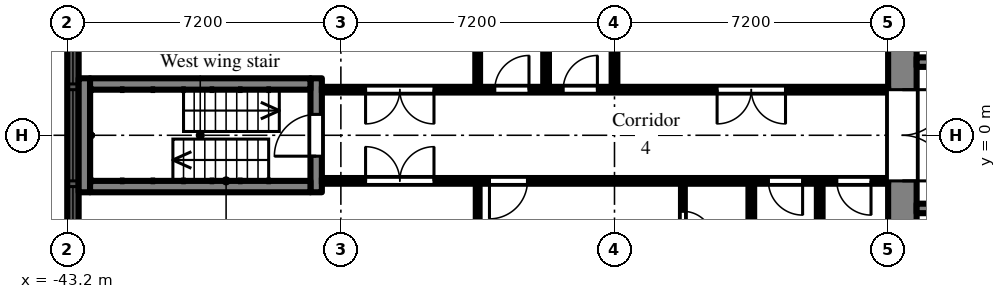
"""IFC4 building model, lengths in metres.
Left out: names, types, materials, properties, quantities, classifications, styles, units other than length and angle.
Written with IfcOpenShell. Run it as: python <this file> out.ifc"""

import sys

from ifc_helpers import new_model, si_unit, direction, frame, frame_2d, origin, place, context, subcontext, project, spatial, rectangle, extrude, element, fill, save


model = new_model("IFC4")
c1 = context("Model", 3, precision=1e-05, world=origin(), true_north=direction((0.0, 1.0)))
c2 = subcontext(c1, "Body", "Model", "MODEL_VIEW")
j1 = project(units=[si_unit("LENGTHUNIT", "METRE"), si_unit("PLANEANGLEUNIT", "RADIAN")], contexts=[c1])
p1 = place(None, origin())
s1 = spatial("IfcSite", under=j1, at=p1, CompositionType="ELEMENT")
p2 = place(p1, origin())
s2 = spatial("IfcBuilding", under=s1, at=p2, CompositionType="ELEMENT")
p3 = place(p2, frame((0.0, 0.0, 75.9)))
s3 = spatial("IfcBuildingStorey", under=s2, at=p3, CompositionType="ELEMENT", Elevation=75.9)
p4 = place(p3, frame((-43.05, 2.7, 0.0), z_axis=(0.0, 0.0, 1.0), x_axis=(0.0, -1.0, 0.0)))
e1 = element("IfcWall", 1, at=p4, inside=s3, PredefinedType="SOLIDWALL", context=c2, shape_type="SweptSolid", body=[
    extrude(rectangle(XDim=5.4, YDim=0.3, at=frame_2d((2.7, 0.0))), origin(), (0.0, 0.0, 1.0), 2.1),
])
p5 = place(p4, frame((1.5, 0.0, 0.2)))
e2 = element("IfcOpeningElement", 2, at=p5, cuts=e1, PredefinedType="OPENING", context=c2, shape_type="SweptSolid", body=[
    extrude(rectangle(XDim=2.4, YDim=1.85, at=frame_2d((1.2, 0.925))), frame((0.0, 0.16, 0.0), z_axis=(0.0, -1.0, 0.0), x_axis=(1.0, 0.0, 0.0)), (0.0, 0.0, 1.0), 0.32),
])
p6 = place(p4, frame((0.15, 0.0, 0.2)))
e3 = element("IfcOpeningElement", 3, at=p6, cuts=e1, PredefinedType="OPENING", context=c2, shape_type="SweptSolid", body=[
    extrude(rectangle(XDim=1.2, YDim=1.85, at=frame_2d((0.6, 0.925))), frame((0.0, 0.16, 0.0), z_axis=(0.0, -1.0, 0.0), x_axis=(1.0, 0.0, 0.0)), (0.0, 0.0, 1.0), 0.32),
])
p7 = place(p4, frame((4.05, 0.0, 0.2)))
e4 = element("IfcOpeningElement", 4, at=p7, cuts=e1, PredefinedType="OPENING", context=c2, shape_type="SweptSolid", body=[
    extrude(rectangle(XDim=1.2, YDim=1.85, at=frame_2d((0.6, 0.925))), frame((0.0, 0.16, 0.0), z_axis=(0.0, -1.0, 0.0), x_axis=(1.0, 0.0, 0.0)), (0.0, 0.0, 1.0), 0.32),
])
p8 = place(p3, frame((-21.225, -7.2, 0.0), z_axis=(0.0, 0.0, 1.0), x_axis=(0.0, 1.0, 0.0)))
e5 = element("IfcWall", 5, at=p8, inside=s3, PredefinedType="SHEAR", context=c2, shape_type="SweptSolid", body=[
    extrude(rectangle(XDim=14.4, YDim=0.75, at=frame_2d((7.2, 0.0))), origin(), (0.0, 0.0, 1.0), 2.575),
])
p9 = place(p8, frame((6.0, 0.0, 0.0)))
e6 = element("IfcOpeningElement", 6, at=p9, cuts=e5, PredefinedType="OPENING", context=c2, shape_type="SweptSolid", body=[
    extrude(rectangle(XDim=2.4, YDim=2.2, at=frame_2d((1.2, 1.1))), frame((0.0, 0.385, 0.0), z_axis=(0.0, -1.0, 0.0), x_axis=(1.0, 0.0, 0.0)), (0.0, 0.0, 1.0), 0.77),
])
p10 = place(p3, frame((-7.9, 1.925, 0.0), z_axis=(0.0, 0.0, 1.0), x_axis=(-1.0, 0.0, 0.0)))
e7 = element("IfcWall", 7, at=p10, inside=s3, PredefinedType="SHEAR", context=c2, shape_type="SweptSolid", body=[
    extrude(rectangle(XDim=12.95, YDim=0.25, at=frame_2d((6.475, 0.0))), origin(), (0.0, 0.0, 1.0), 2.575),
])
p11 = place(p10, frame((0.525, 0.0, 0.0)))
e8 = element("IfcOpeningElement", 8, at=p11, cuts=e7, PredefinedType="OPENING", context=c2, shape_type="SweptSolid", body=[
    extrude(rectangle(XDim=0.9, YDim=2.1, at=frame_2d((0.45, 1.05))), frame((0.0, 0.135, 0.0), z_axis=(0.0, -1.0, 0.0), x_axis=(1.0, 0.0, 0.0)), (0.0, 0.0, 1.0), 0.27),
])
p12 = place(p10, frame((2.625, 0.0, 0.0)))
e9 = element("IfcOpeningElement", 9, at=p12, cuts=e7, PredefinedType="OPENING", context=c2, shape_type="SweptSolid", body=[
    extrude(rectangle(XDim=1.1, YDim=2.1, at=frame_2d((0.55, 1.05))), frame((0.0, 0.135, 0.0), z_axis=(0.0, -1.0, 0.0), x_axis=(1.0, 0.0, 0.0)), (0.0, 0.0, 1.0), 0.27),
])
p13 = place(p10, frame((4.925, 0.0, 0.0)))
e10 = element("IfcOpeningElement", 10, at=p13, cuts=e7, PredefinedType="OPENING", context=c2, shape_type="SweptSolid", body=[
    extrude(rectangle(XDim=0.9, YDim=2.1, at=frame_2d((0.45, 1.05))), frame((0.0, 0.135, 0.0), z_axis=(0.0, -1.0, 0.0), x_axis=(1.0, 0.0, 0.0)), (0.0, 0.0, 1.0), 0.27),
])
p14 = place(p10, frame((8.225, 0.0, 0.0)))
e11 = element("IfcOpeningElement", 11, at=p14, cuts=e7, PredefinedType="OPENING", context=c2, shape_type="SweptSolid", body=[
    extrude(rectangle(XDim=0.9, YDim=2.1, at=frame_2d((0.45, 1.05))), frame((0.0, 0.135, 0.0), z_axis=(0.0, -1.0, 0.0), x_axis=(1.0, 0.0, 0.0)), (0.0, 0.0, 1.0), 0.27),
])
p15 = place(p3, frame((-7.9, -1.925, 0.0), z_axis=(0.0, 0.0, 1.0), x_axis=(-1.0, 0.0, 0.0)))
e12 = element("IfcWall", 12, at=p15, inside=s3, PredefinedType="SHEAR", context=c2, shape_type="SweptSolid", body=[
    extrude(rectangle(XDim=12.95, YDim=0.25, at=frame_2d((6.475, 0.0))), origin(), (0.0, 0.0, 1.0), 2.575),
])
p16 = place(p15, frame((4.825, 0.0, 0.0)))
e13 = element("IfcOpeningElement", 13, at=p16, cuts=e12, PredefinedType="OPENING", context=c2, shape_type="SweptSolid", body=[
    extrude(rectangle(XDim=1.1, YDim=2.1, at=frame_2d((0.55, 1.05))), frame((0.0, 0.135, 0.0), z_axis=(0.0, -1.0, 0.0), x_axis=(1.0, 0.0, 0.0)), (0.0, 0.0, 1.0), 0.27),
])
p17 = place(p15, frame((7.025, 0.0, 0.0)))
e14 = element("IfcOpeningElement", 14, at=p17, cuts=e12, PredefinedType="OPENING", context=c2, shape_type="SweptSolid", body=[
    extrude(rectangle(XDim=1.1, YDim=2.1, at=frame_2d((0.55, 1.05))), frame((0.0, 0.135, 0.0), z_axis=(0.0, -1.0, 0.0), x_axis=(1.0, 0.0, 0.0)), (0.0, 0.0, 1.0), 0.27),
])
p18 = place(p15, frame((9.225, 0.0, 0.0)))
e15 = element("IfcOpeningElement", 15, at=p18, cuts=e12, PredefinedType="OPENING", context=c2, shape_type="SweptSolid", body=[
    extrude(rectangle(XDim=1.1, YDim=2.1, at=frame_2d((0.55, 1.05))), frame((0.0, 0.135, 0.0), z_axis=(0.0, -1.0, 0.0), x_axis=(1.0, 0.0, 0.0)), (0.0, 0.0, 1.0), 0.27),
])
p19 = place(p15, frame((0.525, 0.0, 0.0)))
e16 = element("IfcOpeningElement", 16, at=p19, cuts=e12, PredefinedType="OPENING", context=c2, shape_type="SweptSolid", body=[
    extrude(rectangle(XDim=0.9, YDim=2.1, at=frame_2d((0.45, 1.05))), frame((0.0, 0.135, 0.0), z_axis=(0.0, -1.0, 0.0), x_axis=(1.0, 0.0, 0.0)), (0.0, 0.0, 1.0), 0.27),
])
p20 = place(p15, frame((2.625, 0.0, 0.0)))
e17 = element("IfcOpeningElement", 17, at=p20, cuts=e12, PredefinedType="OPENING", context=c2, shape_type="SweptSolid", body=[
    extrude(rectangle(XDim=1.1, YDim=2.1, at=frame_2d((0.55, 1.05))), frame((0.0, 0.135, 0.0), z_axis=(0.0, -1.0, 0.0), x_axis=(1.0, 0.0, 0.0)), (0.0, 0.0, 1.0), 0.27),
])
p21 = place(p3, frame((-36.65, -1.5, 0.0), z_axis=(0.0, 0.0, 1.0), x_axis=(0.0, 1.0, 0.0)))
e18 = element("IfcWall", 18, at=p21, inside=s3, PredefinedType="SHEAR", context=c2, shape_type="SweptSolid", body=[
    extrude(rectangle(XDim=3.0, YDim=0.3, at=frame_2d((1.5, 0.0))), origin(), (0.0, 0.0, 1.0), 2.575),
])
p22 = place(p21, frame((0.95, 0.0, 0.0)))
e19 = element("IfcOpeningElement", 19, at=p22, cuts=e18, PredefinedType="OPENING", context=c2, shape_type="SweptSolid", body=[
    extrude(rectangle(XDim=1.1, YDim=2.1, at=frame_2d((0.55, 1.05))), frame((0.0, 0.16, 0.0), z_axis=(0.0, -1.0, 0.0), x_axis=(1.0, 0.0, 0.0)), (0.0, 0.0, 1.0), 0.32),
])
p23 = place(p3, frame((-42.75, -1.5, 0.0), z_axis=(0.0, 0.0, 1.0), x_axis=(0.0, 1.0, 0.0)))
e20 = element("IfcWall", 20, at=p23, inside=s3, PredefinedType="SHEAR", context=c2, shape_type="SweptSolid", body=[
    extrude(rectangle(XDim=3.0, YDim=0.3, at=frame_2d((1.5, 0.0))), origin(), (0.0, 0.0, 1.0), 2.575),
])
for number, where, z_axis, x_axis in (
    (21, (-36.8, -1.35, 0.0), (0.0, 0.0, 1.0), (-1.0, 0.0, 0.0)),
    (22, (-36.8, 1.35, 0.0), (0.0, 0.0, 1.0), (-1.0, 0.0, 0.0)),
):
    element("IfcWall", number, at=place(p3, frame(where, z_axis=z_axis, x_axis=x_axis)), inside=s3, PredefinedType="SHEAR", context=c2, shape_type="SweptSolid", body=[
        extrude(rectangle(XDim=5.8, YDim=0.3, at=frame_2d((2.9, 0.0))), origin(), (0.0, 0.0, 1.0), 2.575),
    ])
p24 = place(p3, frame((-36.5, -1.2, 0.0), z_axis=(0.0, 0.0, 1.0), x_axis=(1.0, 0.0, 0.0)))
e23 = element("IfcWall", 23, at=p24, inside=s3, PredefinedType="PARTITIONING", context=c2, shape_type="SweptSolid", body=[
    extrude(rectangle(XDim=14.9, YDim=0.15, at=frame_2d((7.45, 0.0))), origin(), (0.0, 0.0, 1.0), 2.575),
])
p25 = place(p24, frame((13.55, 0.0, 0.0)))
e24 = element("IfcOpeningElement", 24, at=p25, cuts=e23, PredefinedType="OPENING", context=c2, shape_type="SweptSolid", body=[
    extrude(rectangle(XDim=0.9, YDim=2.1, at=frame_2d((0.45, 1.05))), frame((0.0, 0.085, 0.0), z_axis=(0.0, -1.0, 0.0), x_axis=(1.0, 0.0, 0.0)), (0.0, 0.0, 1.0), 0.17),
])
p26 = place(p24, frame((11.75, 0.0, 0.0)))
e25 = element("IfcOpeningElement", 25, at=p26, cuts=e23, PredefinedType="OPENING", context=c2, shape_type="SweptSolid", body=[
    extrude(rectangle(XDim=0.9, YDim=2.1, at=frame_2d((0.45, 1.05))), frame((0.0, 0.085, 0.0), z_axis=(0.0, -1.0, 0.0), x_axis=(1.0, 0.0, 0.0)), (0.0, 0.0, 1.0), 0.17),
])
p27 = place(p24, frame((4.41, 0.0, 0.0)))
e26 = element("IfcOpeningElement", 26, at=p27, cuts=e23, PredefinedType="OPENING", context=c2, shape_type="SweptSolid", body=[
    extrude(rectangle(XDim=1.0, YDim=2.1, at=frame_2d((0.5, 1.05))), frame((0.0, 0.085, 0.0), z_axis=(0.0, -1.0, 0.0), x_axis=(1.0, 0.0, 0.0)), (0.0, 0.0, 1.0), 0.17),
])
p28 = place(p24, frame((1.15, 0.0, 0.0)))
e27 = element("IfcOpeningElement", 27, at=p28, cuts=e23, PredefinedType="OPENING", context=c2, shape_type="SweptSolid", body=[
    extrude(rectangle(XDim=1.8, YDim=2.1, at=frame_2d((0.9, 1.05))), frame((0.0, 0.085, 0.0), z_axis=(0.0, -1.0, 0.0), x_axis=(1.0, 0.0, 0.0)), (0.0, 0.0, 1.0), 0.17),
])
p29 = place(p3, frame((-36.5, 1.2, 0.0), z_axis=(0.0, 0.0, 1.0), x_axis=(1.0, 0.0, 0.0)))
e28 = element("IfcWall", 28, at=p29, inside=s3, PredefinedType="PARTITIONING", context=c2, shape_type="SweptSolid", body=[
    extrude(rectangle(XDim=14.9, YDim=0.15, at=frame_2d((7.45, 0.0))), origin(), (0.0, 0.0, 1.0), 2.575),
])
p30 = place(p29, frame((10.4, 0.0, 0.0)))
e29 = element("IfcOpeningElement", 29, at=p30, cuts=e28, PredefinedType="OPENING", context=c2, shape_type="SweptSolid", body=[
    extrude(rectangle(XDim=1.8, YDim=2.1, at=frame_2d((0.9, 1.05))), frame((0.0, 0.085, 0.0), z_axis=(0.0, -1.0, 0.0), x_axis=(1.0, 0.0, 0.0)), (0.0, 0.0, 1.0), 0.17),
])
p31 = place(p29, frame((6.35, 0.0, 0.0)))
e30 = element("IfcOpeningElement", 30, at=p31, cuts=e28, PredefinedType="OPENING", context=c2, shape_type="SweptSolid", body=[
    extrude(rectangle(XDim=0.9, YDim=2.1, at=frame_2d((0.45, 1.05))), frame((0.0, 0.085, 0.0), z_axis=(0.0, -1.0, 0.0), x_axis=(1.0, 0.0, 0.0)), (0.0, 0.0, 1.0), 0.17),
])
p32 = place(p29, frame((4.55, 0.0, 0.0)))
e31 = element("IfcOpeningElement", 31, at=p32, cuts=e28, PredefinedType="OPENING", context=c2, shape_type="SweptSolid", body=[
    extrude(rectangle(XDim=0.9, YDim=2.1, at=frame_2d((0.45, 1.05))), frame((0.0, 0.085, 0.0), z_axis=(0.0, -1.0, 0.0), x_axis=(1.0, 0.0, 0.0)), (0.0, 0.0, 1.0), 0.17),
])
p33 = place(p29, frame((1.15, 0.0, 0.0)))
e32 = element("IfcOpeningElement", 32, at=p33, cuts=e28, PredefinedType="OPENING", context=c2, shape_type="SweptSolid", body=[
    extrude(rectangle(XDim=1.8, YDim=2.1, at=frame_2d((0.9, 1.05))), frame((0.0, 0.085, 0.0), z_axis=(0.0, -1.0, 0.0), x_axis=(1.0, 0.0, 0.0)), (0.0, 0.0, 1.0), 0.17),
])
p34 = place(p3, frame((-32.4, -6.9, 0.0), z_axis=(0.0, 0.0, 1.0), x_axis=(0.0, 1.0, 0.0)))
e33 = element("IfcWall", 33, at=p34, inside=s3, PredefinedType="PARTITIONING", context=c2, shape_type="SweptSolid", body=[
    extrude(rectangle(XDim=5.625, YDim=0.1, at=frame_2d((2.812, 0.0))), origin(), (0.0, 0.0, 1.0), 2.575),
])
p35 = place(p3, frame((-32.4, 1.275, 0.0), z_axis=(0.0, 0.0, 1.0), x_axis=(0.0, 1.0, 0.0)))
e34 = element("IfcWall", 34, at=p35, inside=s3, PredefinedType="PARTITIONING", context=c2, shape_type="SweptSolid", body=[
    extrude(rectangle(XDim=5.625, YDim=0.125, at=frame_2d((2.812, 0.0))), origin(), (0.0, 0.0, 1.0), 2.575),
])
for number, where, z_axis, x_axis in (
    (35, (-30.6, 1.275, 0.0), (0.0, 0.0, 1.0), (0.0, 1.0, 0.0)),
    (36, (-28.8, 1.275, 0.0), (0.0, 0.0, 1.0), (0.0, 1.0, 0.0)),
):
    element("IfcWall", number, at=place(p3, frame(where, z_axis=z_axis, x_axis=x_axis)), inside=s3, PredefinedType="PARTITIONING", context=c2, shape_type="SweptSolid", body=[
        extrude(rectangle(XDim=5.625, YDim=0.15, at=frame_2d((2.812, 0.0))), origin(), (0.0, 0.0, 1.0), 2.575),
    ])
p36 = place(p3, frame((-27.0, -3.65, 0.0), z_axis=(0.0, 0.0, 1.0), x_axis=(0.0, 1.0, 0.0)))
e37 = element("IfcWall", 37, at=p36, inside=s3, PredefinedType="PARTITIONING", context=c2, shape_type="SweptSolid", body=[
    extrude(rectangle(XDim=2.375, YDim=0.1, at=frame_2d((1.188, 0.0))), origin(), (0.0, 0.0, 1.0), 2.575),
])
p37 = place(p36, frame((0.85, 0.0, 0.0)))
e38 = element("IfcOpeningElement", 38, at=p37, cuts=e37, PredefinedType="OPENING", context=c2, shape_type="SweptSolid", body=[
    extrude(rectangle(XDim=0.8, YDim=2.1, at=frame_2d((0.4, 1.05))), frame((0.0, 0.06, 0.0), z_axis=(0.0, -1.0, 0.0), x_axis=(1.0, 0.0, 0.0)), (0.0, 0.0, 1.0), 0.12),
])
for number, where, z_axis, x_axis in (
    (39, (-25.2, -6.9, 0.0), (0.0, 0.0, 1.0), (0.0, 1.0, 0.0)),
    (40, (-23.4, -6.9, 0.0), (0.0, 0.0, 1.0), (0.0, 1.0, 0.0)),
):
    element("IfcWall", number, at=place(p3, frame(where, z_axis=z_axis, x_axis=x_axis)), inside=s3, PredefinedType="PARTITIONING", context=c2, shape_type="SweptSolid", body=[
        extrude(rectangle(XDim=5.625, YDim=0.15, at=frame_2d((2.812, 0.0))), origin(), (0.0, 0.0, 1.0), 2.575),
    ])
p38 = place(p5, origin())
e41 = element("IfcWindow", 41, at=p38, inside=s3, PartitioningType="SINGLE_PANEL", PredefinedType="WINDOW", context=c2, shape_type="SweptSolid", body=[
    extrude(rectangle(XDim=2.4, YDim=1.85, at=frame_2d((1.2, 0.925))), frame((0.0, 0.03, 0.0), z_axis=(0.0, -1.0, 0.0), x_axis=(1.0, 0.0, 0.0)), (0.0, 0.0, 1.0), 0.06),
])
fill(e2, e41)
p39 = place(p6, origin())
e42 = element("IfcWindow", 42, at=p39, inside=s3, PartitioningType="SINGLE_PANEL", PredefinedType="WINDOW", context=c2, shape_type="SweptSolid", body=[
    extrude(rectangle(XDim=1.2, YDim=1.85, at=frame_2d((0.6, 0.925))), frame((0.0, 0.03, 0.0), z_axis=(0.0, -1.0, 0.0), x_axis=(1.0, 0.0, 0.0)), (0.0, 0.0, 1.0), 0.06),
])
fill(e3, e42)
p40 = place(p7, origin())
e43 = element("IfcWindow", 43, at=p40, inside=s3, PartitioningType="SINGLE_PANEL", PredefinedType="WINDOW", context=c2, shape_type="SweptSolid", body=[
    extrude(rectangle(XDim=1.2, YDim=1.85, at=frame_2d((0.6, 0.925))), frame((0.0, 0.03, 0.0), z_axis=(0.0, -1.0, 0.0), x_axis=(1.0, 0.0, 0.0)), (0.0, 0.0, 1.0), 0.06),
])
fill(e4, e43)
p41 = place(p9, frame((2.4, 0.0, 0.0), z_axis=(0.0, 0.0, 1.0), x_axis=(-1.0, 0.0, 0.0)))
e44 = element("IfcDoor", 44, at=p41, inside=s3, OperationType="DOUBLE_DOOR_DOUBLE_SWING", PredefinedType="DOOR", context=c2, shape_type="SweptSolid", body=[
    extrude(rectangle(XDim=2.4, YDim=2.2, at=frame_2d((1.2, 1.1))), frame((0.0, 0.025, 0.0), z_axis=(0.0, -1.0, 0.0), x_axis=(1.0, 0.0, 0.0)), (0.0, 0.0, 1.0), 0.05),
])
fill(e6, e44)
p42 = place(p22, origin())
e45 = element("IfcDoor", 45, at=p42, inside=s3, OperationType="SINGLE_SWING_LEFT", PredefinedType="DOOR", context=c2, shape_type="SweptSolid", body=[
    extrude(rectangle(XDim=1.1, YDim=2.1, at=frame_2d((0.55, 1.05))), frame((0.0, 0.025, 0.0), z_axis=(0.0, -1.0, 0.0), x_axis=(1.0, 0.0, 0.0)), (0.0, 0.0, 1.0), 0.05),
])
fill(e19, e45)
p43 = place(p25, frame((0.9, 0.0, 0.0), z_axis=(0.0, 0.0, 1.0), x_axis=(-1.0, 0.0, 0.0)))
e46 = element("IfcDoor", 46, at=p43, inside=s3, OperationType="SINGLE_SWING_LEFT", PredefinedType="DOOR", context=c2, shape_type="SweptSolid", body=[
    extrude(rectangle(XDim=0.9, YDim=2.1, at=frame_2d((0.45, 1.05))), frame((0.0, 0.025, 0.0), z_axis=(0.0, -1.0, 0.0), x_axis=(1.0, 0.0, 0.0)), (0.0, 0.0, 1.0), 0.05),
])
fill(e24, e46)
p44 = place(p26, frame((0.9, 0.0, 0.0), z_axis=(0.0, 0.0, 1.0), x_axis=(-1.0, 0.0, 0.0)))
e47 = element("IfcDoor", 47, at=p44, inside=s3, OperationType="SINGLE_SWING_LEFT", PredefinedType="DOOR", context=c2, shape_type="SweptSolid", body=[
    extrude(rectangle(XDim=0.9, YDim=2.1, at=frame_2d((0.45, 1.05))), frame((0.0, 0.025, 0.0), z_axis=(0.0, -1.0, 0.0), x_axis=(1.0, 0.0, 0.0)), (0.0, 0.0, 1.0), 0.05),
])
fill(e25, e47)
p45 = place(p37, frame((0.8, 0.0, 0.0), z_axis=(0.0, 0.0, 1.0), x_axis=(-1.0, 0.0, 0.0)))
e48 = element("IfcDoor", 48, at=p45, inside=s3, OperationType="SINGLE_SWING_RIGHT", PredefinedType="DOOR", context=c2, shape_type="SweptSolid", body=[
    extrude(rectangle(XDim=0.8, YDim=2.1, at=frame_2d((0.4, 1.05))), frame((0.0, 0.025, 0.0), z_axis=(0.0, -1.0, 0.0), x_axis=(1.0, 0.0, 0.0)), (0.0, 0.0, 1.0), 0.05),
])
fill(e38, e48)
p46 = place(p27, frame((1.0, 0.0, 0.0), z_axis=(0.0, 0.0, 1.0), x_axis=(-1.0, 0.0, 0.0)))
e49 = element("IfcDoor", 49, at=p46, inside=s3, OperationType="SINGLE_SWING_RIGHT", PredefinedType="DOOR", context=c2, shape_type="SweptSolid", body=[
    extrude(rectangle(XDim=1.0, YDim=2.1, at=frame_2d((0.5, 1.05))), frame((0.0, 0.025, 0.0), z_axis=(0.0, -1.0, 0.0), x_axis=(1.0, 0.0, 0.0)), (0.0, 0.0, 1.0), 0.05),
])
fill(e26, e49)
p47 = place(p28, origin())
e50 = element("IfcDoor", 50, at=p47, inside=s3, OperationType="DOUBLE_DOOR_DOUBLE_SWING", PredefinedType="DOOR", context=c2, shape_type="SweptSolid", body=[
    extrude(rectangle(XDim=1.8, YDim=2.1, at=frame_2d((0.9, 1.05))), frame((0.0, 0.025, 0.0), z_axis=(0.0, -1.0, 0.0), x_axis=(1.0, 0.0, 0.0)), (0.0, 0.0, 1.0), 0.05),
])
fill(e27, e50)
p48 = place(p30, frame((1.8, 0.0, 0.0), z_axis=(0.0, 0.0, 1.0), x_axis=(-1.0, 0.0, 0.0)))
e51 = element("IfcDoor", 51, at=p48, inside=s3, OperationType="DOUBLE_DOOR_DOUBLE_SWING", PredefinedType="DOOR", context=c2, shape_type="SweptSolid", body=[
    extrude(rectangle(XDim=1.8, YDim=2.1, at=frame_2d((0.9, 1.05))), frame((0.0, 0.025, 0.0), z_axis=(0.0, -1.0, 0.0), x_axis=(1.0, 0.0, 0.0)), (0.0, 0.0, 1.0), 0.05),
])
fill(e29, e51)
p49 = place(p31, origin())
e52 = element("IfcDoor", 52, at=p49, inside=s3, OperationType="SINGLE_SWING_RIGHT", PredefinedType="DOOR", context=c2, shape_type="SweptSolid", body=[
    extrude(rectangle(XDim=0.9, YDim=2.1, at=frame_2d((0.45, 1.05))), frame((0.0, 0.025, 0.0), z_axis=(0.0, -1.0, 0.0), x_axis=(1.0, 0.0, 0.0)), (0.0, 0.0, 1.0), 0.05),
])
fill(e30, e52)
p50 = place(p32, origin())
e53 = element("IfcDoor", 53, at=p50, inside=s3, OperationType="SINGLE_SWING_RIGHT", PredefinedType="DOOR", context=c2, shape_type="SweptSolid", body=[
    extrude(rectangle(XDim=0.9, YDim=2.1, at=frame_2d((0.45, 1.05))), frame((0.0, 0.025, 0.0), z_axis=(0.0, -1.0, 0.0), x_axis=(1.0, 0.0, 0.0)), (0.0, 0.0, 1.0), 0.05),
])
fill(e31, e53)
p51 = place(p33, frame((1.8, 0.0, 0.0), z_axis=(0.0, 0.0, 1.0), x_axis=(-1.0, 0.0, 0.0)))
e54 = element("IfcDoor", 54, at=p51, inside=s3, OperationType="DOUBLE_DOOR_DOUBLE_SWING", PredefinedType="DOOR", context=c2, shape_type="SweptSolid", body=[
    extrude(rectangle(XDim=1.8, YDim=2.1, at=frame_2d((0.9, 1.05))), frame((0.0, 0.025, 0.0), z_axis=(0.0, -1.0, 0.0), x_axis=(1.0, 0.0, 0.0)), (0.0, 0.0, 1.0), 0.05),
])
fill(e32, e54)
save(model, sys.argv[1])
